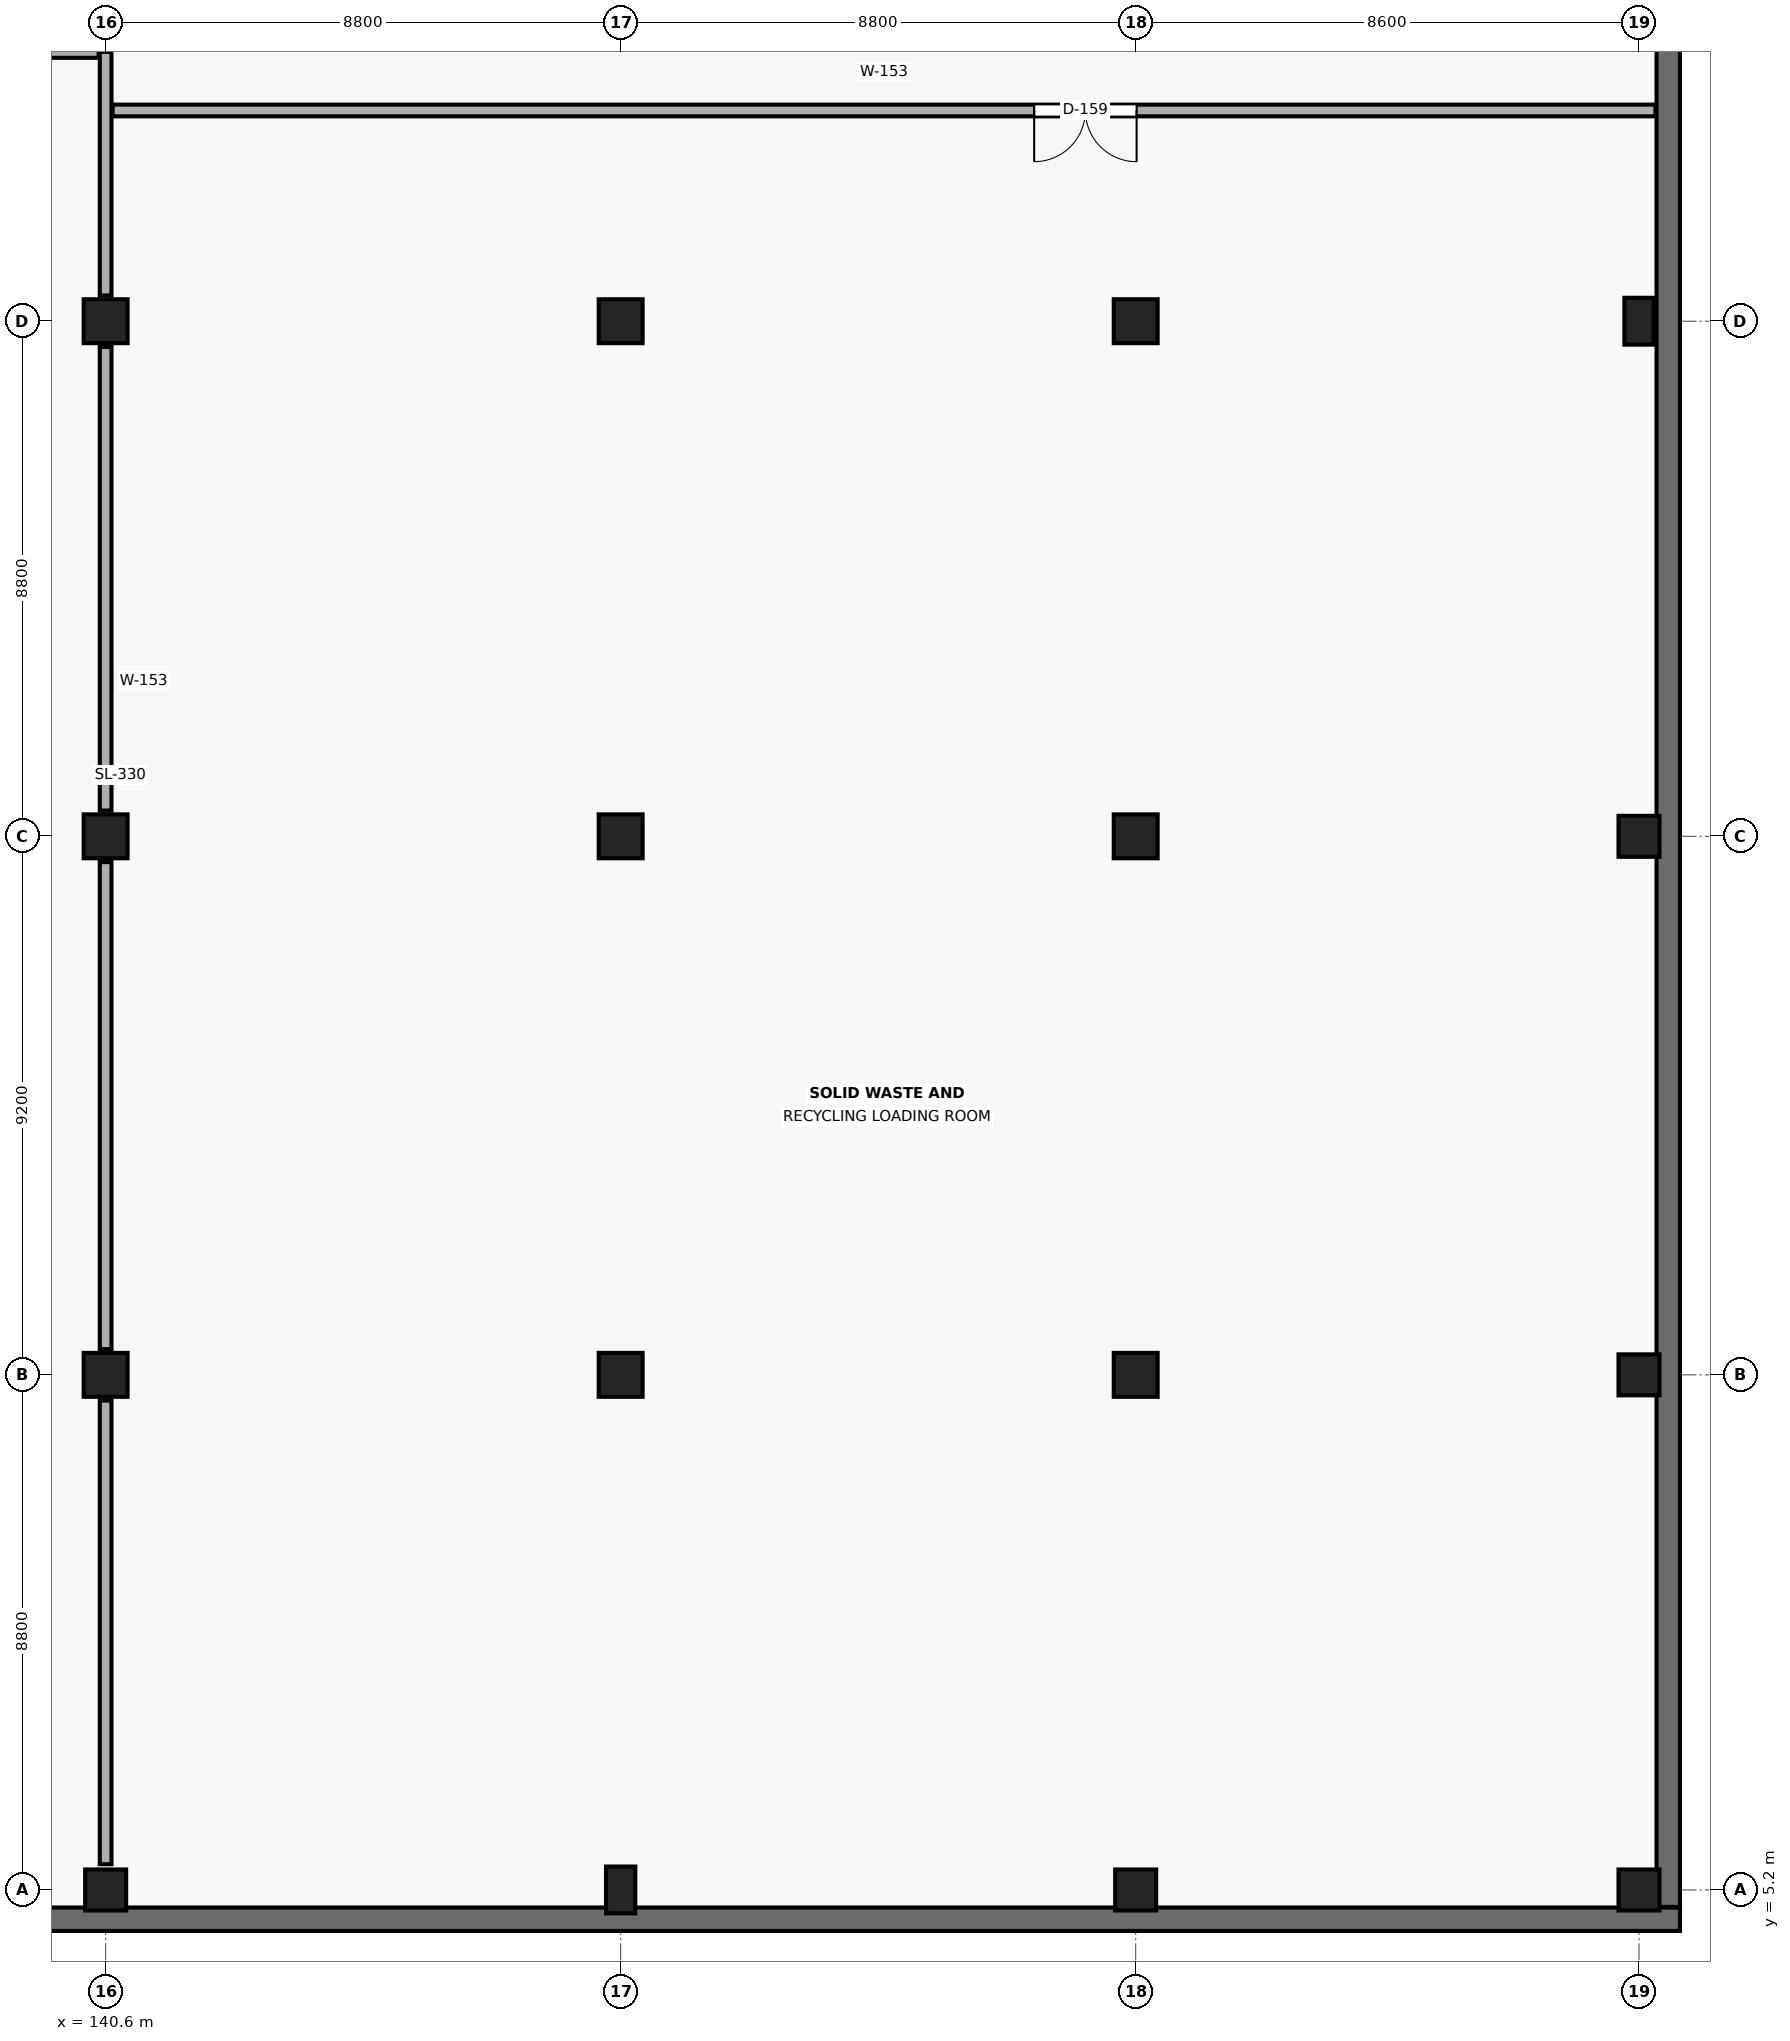
"""IFC4 building model, lengths in metres.
Left out: names, types, materials, properties, quantities, classifications, styles, units other than length and angle.
Written with IfcOpenShell. Run it as: python <this file> out.ifc"""

import sys

from ifc_helpers import new_model, si_unit, direction, frame, frame_2d, origin, origin_2d, place, context, subcontext, project, spatial, rectangle, extrude, element, fill, save


model = new_model("IFC4")
c1 = context("Model", 3, precision=1e-05, world=origin(), true_north=direction((0.0, 1.0)))
c2 = subcontext(c1, "Body", "Model", "MODEL_VIEW")
j1 = project(units=[si_unit("LENGTHUNIT", "METRE"), si_unit("PLANEANGLEUNIT", "RADIAN")], contexts=[c1])
p1 = place(None, origin())
s1 = spatial("IfcSite", under=j1, at=p1, CompositionType="ELEMENT")
p2 = place(p1, origin())
s2 = spatial("IfcBuilding", under=s1, at=p2, CompositionType="ELEMENT")
p3 = place(p2, frame((0.0, 0.0, -4.5)))
s3 = spatial("IfcBuildingStorey", under=s2, at=p3, CompositionType="ELEMENT", Elevation=-4.5)
p4 = place(p3, frame((140.6, 5.2, 0.0), z_axis=(0.0, 0.0, 1.0), x_axis=(1.0, 0.0, 0.0)))
e1 = element("IfcColumn", 1, at=p4, inside=s3, PredefinedType="COLUMN", context=c2, shape_type="SweptSolid", body=[
    extrude(rectangle(XDim=0.7, YDim=0.7, at=origin_2d()), origin(), (0.0, 0.0, 1.0), 4.5),
])
for number, where, z_axis, x_axis in (
    (2, (140.6, 14.0, 0.0), (0.0, 0.0, 1.0), (1.0, 0.0, 0.0)),
    (3, (140.6, 23.2, 0.0), (0.0, 0.0, 1.0), (1.0, 0.0, 0.0)),
    (4, (140.6, 32.0, 0.0), (0.0, 0.0, 1.0), (1.0, 0.0, 0.0)),
):
    element("IfcColumn", number, at=place(p3, frame(where, z_axis=z_axis, x_axis=x_axis)), inside=s3, PredefinedType="COLUMN", context=c2, shape_type="SweptSolid", body=[
        extrude(rectangle(XDim=0.75, YDim=0.75, at=origin_2d()), origin(), (0.0, 0.0, 1.0), 4.5),
    ])
p5 = place(p3, frame((149.4, 5.2, 0.0), z_axis=(0.0, 0.0, 1.0), x_axis=(1.0, 0.0, 0.0)))
e5 = element("IfcColumn", 5, at=p5, inside=s3, PredefinedType="PILASTER", context=c2, shape_type="SweptSolid", body=[
    extrude(rectangle(XDim=0.5, YDim=0.8, at=origin_2d()), origin(), (0.0, 0.0, 1.0), 4.5),
])
for number, where, z_axis, x_axis in (
    (6, (149.4, 14.0, 0.0), (0.0, 0.0, 1.0), (1.0, 0.0, 0.0)),
    (7, (149.4, 23.2, 0.0), (0.0, 0.0, 1.0), (1.0, 0.0, 0.0)),
    (8, (149.4, 32.0, 0.0), (0.0, 0.0, 1.0), (1.0, 0.0, 0.0)),
):
    element("IfcColumn", number, at=place(p3, frame(where, z_axis=z_axis, x_axis=x_axis)), inside=s3, PredefinedType="COLUMN", context=c2, shape_type="SweptSolid", body=[
        extrude(rectangle(XDim=0.75, YDim=0.75, at=origin_2d()), origin(), (0.0, 0.0, 1.0), 4.5),
    ])
p6 = place(p3, frame((158.2, 5.2, 0.0), z_axis=(0.0, 0.0, 1.0), x_axis=(1.0, 0.0, 0.0)))
e9 = element("IfcColumn", 9, at=p6, inside=s3, PredefinedType="COLUMN", context=c2, shape_type="SweptSolid", body=[
    extrude(rectangle(XDim=0.7, YDim=0.7, at=origin_2d()), origin(), (0.0, 0.0, 1.0), 4.5),
])
for number, where, z_axis, x_axis in (
    (10, (158.2, 14.0, 0.0), (0.0, 0.0, 1.0), (1.0, 0.0, 0.0)),
    (11, (158.2, 23.2, 0.0), (0.0, 0.0, 1.0), (1.0, 0.0, 0.0)),
    (12, (158.2, 32.0, 0.0), (0.0, 0.0, 1.0), (1.0, 0.0, 0.0)),
):
    element("IfcColumn", number, at=place(p3, frame(where, z_axis=z_axis, x_axis=x_axis)), inside=s3, PredefinedType="COLUMN", context=c2, shape_type="SweptSolid", body=[
        extrude(rectangle(XDim=0.75, YDim=0.75, at=origin_2d()), origin(), (0.0, 0.0, 1.0), 4.5),
    ])
for number, where, z_axis, x_axis in (
    (13, (166.8, 5.2, 0.0), (0.0, 0.0, 1.0), (1.0, 0.0, 0.0)),
    (14, (166.8, 14.0, 0.0), (0.0, 0.0, 1.0), (1.0, 0.0, 0.0)),
    (15, (166.8, 23.2, 0.0), (0.0, 0.0, 1.0), (1.0, 0.0, 0.0)),
):
    element("IfcColumn", number, at=place(p3, frame(where, z_axis=z_axis, x_axis=x_axis)), inside=s3, PredefinedType="COLUMN", context=c2, shape_type="SweptSolid", body=[
        extrude(rectangle(XDim=0.7, YDim=0.7, at=origin_2d()), origin(), (0.0, 0.0, 1.0), 4.5),
    ])
p7 = place(p3, frame((166.8, 32.0, 0.0), z_axis=(0.0, 0.0, 1.0), x_axis=(1.0, 0.0, 0.0)))
e16 = element("IfcColumn", 16, at=p7, inside=s3, PredefinedType="PILASTER", context=c2, shape_type="SweptSolid", body=[
    extrude(rectangle(XDim=0.5, YDim=0.8, at=origin_2d()), origin(), (0.0, 0.0, 1.0), 4.5),
])
p8 = place(p3, frame((4.5, 4.7, 0.0), z_axis=(0.0, 0.0, 1.0), x_axis=(1.0, 0.0, 0.0)))
e17 = element("IfcWall", 17, at=p8, inside=s3, PredefinedType="STANDARD", context=c2, shape_type="SweptSolid", body=[
    extrude(rectangle(XDim=163.0, YDim=0.4, at=frame_2d((81.5, 0.0))), origin(), (0.0, 0.0, 1.0), 4.14),
])
p9 = place(p3, frame((167.3, 4.91, 0.0), z_axis=(0.0, 0.0, 1.0), x_axis=(0.0, 1.0, 0.0)))
e18 = element("IfcWall", 18, at=p9, inside=s3, PredefinedType="STANDARD", context=c2, shape_type="SweptSolid", body=[
    extrude(rectangle(XDim=112.18, YDim=0.4, at=frame_2d((56.09, 0.0))), origin(), (0.0, 0.0, 1.0), 4.14),
])
p10 = place(p3, frame((140.6, 5.64, 0.0), z_axis=(0.0, 0.0, 1.0), x_axis=(0.0, 1.0, 0.0)))
e19 = element("IfcWall", 19, at=p10, inside=s3, PredefinedType="STANDARD", context=c2, shape_type="SweptSolid", body=[
    extrude(rectangle(XDim=7.92, YDim=0.2, at=frame_2d((3.96, 0.0))), origin(), (0.0, 0.0, 1.0), 3.29),
])
p11 = place(p3, frame((140.6, 14.44, 0.0), z_axis=(0.0, 0.0, 1.0), x_axis=(0.0, 1.0, 0.0)))
e20 = element("IfcWall", 20, at=p11, inside=s3, PredefinedType="STANDARD", context=c2, shape_type="SweptSolid", body=[
    extrude(rectangle(XDim=8.32, YDim=0.2, at=frame_2d((4.16, 0.0))), origin(), (0.0, 0.0, 1.0), 3.29),
])
p12 = place(p3, frame((140.6, 23.64, 0.0), z_axis=(0.0, 0.0, 1.0), x_axis=(0.0, 1.0, 0.0)))
e21 = element("IfcWall", 21, at=p12, inside=s3, PredefinedType="STANDARD", context=c2, shape_type="SweptSolid", body=[
    extrude(rectangle(XDim=7.92, YDim=0.2, at=frame_2d((3.96, 0.0))), origin(), (0.0, 0.0, 1.0), 3.29),
])
p13 = place(p3, frame((140.6, 32.44, 0.0), z_axis=(0.0, 0.0, 1.0), x_axis=(0.0, 1.0, 0.0)))
e22 = element("IfcWall", 22, at=p13, inside=s3, PredefinedType="STANDARD", context=c2, shape_type="SweptSolid", body=[
    extrude(rectangle(XDim=4.16, YDim=0.2, at=frame_2d((2.08, 0.0))), origin(), (0.0, 0.0, 1.0), 3.29),
])
p14 = place(p3, frame((114.32, 36.6, 0.0), z_axis=(0.0, 0.0, 1.0), x_axis=(1.0, 0.0, 0.0)))
e23 = element("IfcWall", 23, at=p14, inside=s3, PredefinedType="STANDARD", context=c2, shape_type="SweptSolid", body=[
    extrude(rectangle(XDim=26.16, YDim=0.2, at=frame_2d((13.08, 0.0))), origin(), (0.0, 0.0, 1.0), 4.14),
])
p15 = place(p14, frame((8.504, 0.0, 0.0)))
e24 = element("IfcOpeningElement", 24, at=p15, cuts=e23, PredefinedType="OPENING", context=c2, shape_type="SweptSolid", body=[
    extrude(rectangle(XDim=1.95, YDim=2.5, at=frame_2d((0.975, 1.25))), frame((0.0, 0.112, 0.0), z_axis=(0.0, -1.0, 0.0), x_axis=(1.0, 0.0, 0.0)), (0.0, 0.0, 1.0), 0.224),
])
p16 = place(p3, frame((167.08, 35.6, 0.0), z_axis=(0.0, 0.0, 1.0), x_axis=(-1.0, 0.0, 0.0)))
e25 = element("IfcWall", 25, at=p16, inside=s3, PredefinedType="STANDARD", context=c2, shape_type="SweptSolid", body=[
    extrude(rectangle(XDim=26.36, YDim=0.2, at=frame_2d((13.18, 0.0))), origin(), (0.0, 0.0, 1.0), 4.14),
])
p17 = place(p16, frame((8.864, 0.0, 0.0)))
e26 = element("IfcOpeningElement", 26, at=p17, cuts=e25, PredefinedType="OPENING", context=c2, shape_type="SweptSolid", body=[
    extrude(rectangle(XDim=1.75, YDim=2.4, at=frame_2d((0.875, 1.2))), frame((0.0, 0.112, 0.0), z_axis=(0.0, -1.0, 0.0), x_axis=(1.0, 0.0, 0.0)), (0.0, 0.0, 1.0), 0.224),
])
p18 = place(p17, origin())
e27 = element("IfcDoor", 27, at=p18, inside=s3, OperationType="DOUBLE_DOOR_SINGLE_SWING", PredefinedType="DOOR", context=c2, shape_type="SweptSolid", body=[
    extrude(rectangle(XDim=1.75, YDim=2.4, at=frame_2d((0.875, 1.2))), frame((0.0, 0.025, 0.0), z_axis=(0.0, -1.0, 0.0), x_axis=(1.0, 0.0, 0.0)), (0.0, 0.0, 1.0), 0.05),
])
fill(e26, e27)
save(model, sys.argv[1])
